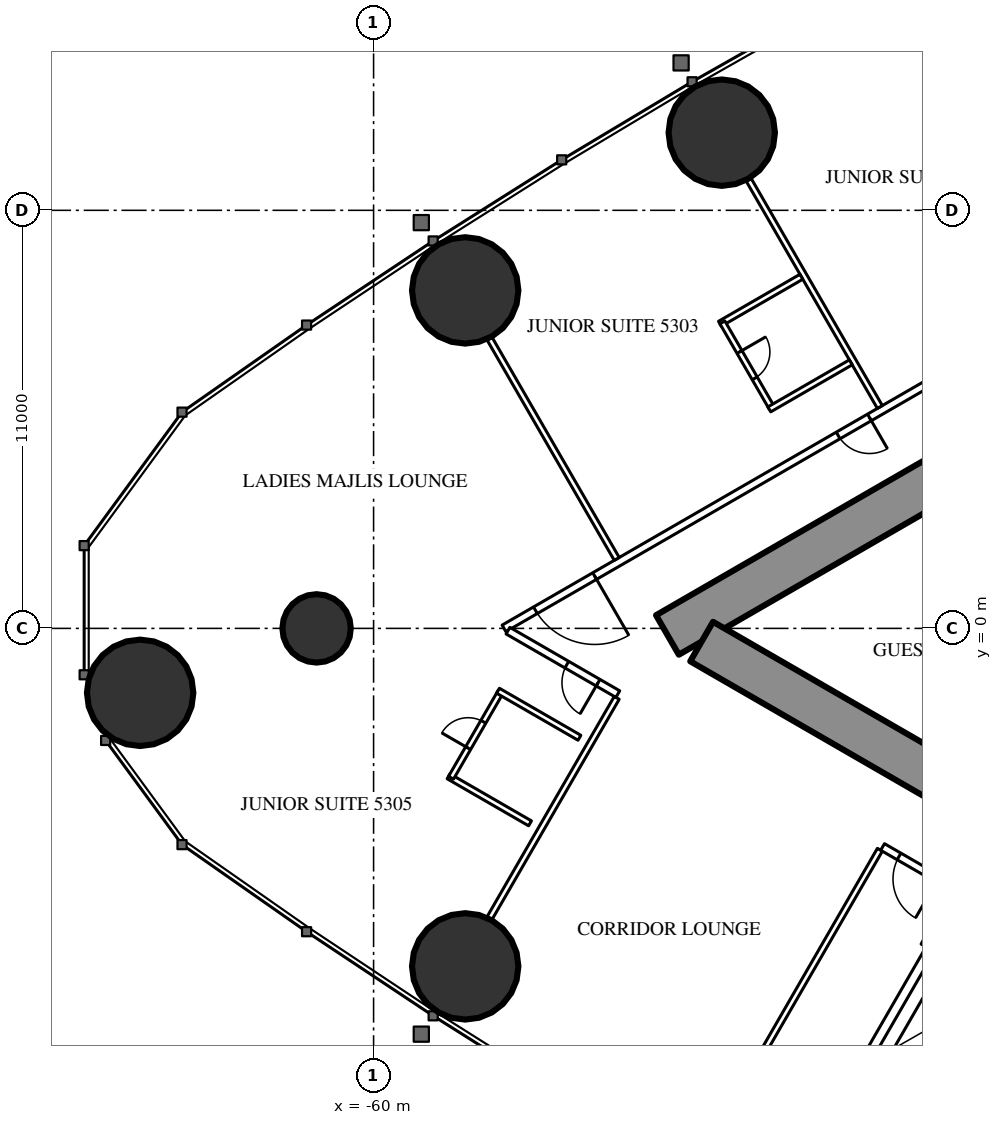
"""IFC4 building model, lengths in metres.
Left out: names, types, materials, properties, quantities, classifications, styles, units other than length and angle.
Written with IfcOpenShell. Run it as: python <this file> out.ifc"""

import sys

from ifc_helpers import new_model, si_unit, direction, frame, frame_2d, origin, origin_2d, place, context, subcontext, project, spatial, rectangle, circle, extrude, element, fill, save


model = new_model("IFC4")
c1 = context("Model", 3, precision=1e-05, world=origin(), true_north=direction((0.0, 1.0)))
c2 = subcontext(c1, "Body", "Model", "MODEL_VIEW")
j1 = project(units=[si_unit("LENGTHUNIT", "METRE"), si_unit("PLANEANGLEUNIT", "RADIAN")], contexts=[c1])
p1 = place(None, origin())
s1 = spatial("IfcSite", under=j1, at=p1, CompositionType="ELEMENT")
p2 = place(p1, origin())
s2 = spatial("IfcBuilding", under=s1, at=p2, CompositionType="ELEMENT")
p3 = place(p2, frame((0.0, 0.0, 198.3)))
s3 = spatial("IfcBuildingStorey", under=s2, at=p3, CompositionType="ELEMENT", Elevation=198.3)
for number, where, z_axis, x_axis in (
    (1, (-66.143, -1.695, 0.0), (0.0, 0.0, 1.0), (1.0, 0.0, 0.0)),
    (2, (-57.59, -8.893, 0.0), (0.0, 0.0, 1.0), (1.0, 0.0, 0.0)),
    (3, (-50.839, 13.043, 0.0), (0.0, 0.0, 1.0), (1.0, 0.0, 0.0)),
    (4, (-57.59, 8.893, 0.0), (0.0, 0.0, 1.0), (1.0, 0.0, 0.0)),
):
    element("IfcColumn", number, at=place(p3, frame(where, z_axis=z_axis, x_axis=x_axis)), inside=s3, PredefinedType="COLUMN", context=c2, shape_type="SweptSolid", body=[
        extrude(circle(Radius=1.4, at=origin_2d()), origin(), (0.0, 0.0, 1.0), 3.5),
    ])
p4 = place(p3, frame((-61.5, 0.0, 0.0), z_axis=(0.0, 0.0, 1.0), x_axis=(1.0, 0.0, 0.0)))
e5 = element("IfcColumn", 5, at=p4, inside=s3, PredefinedType="COLUMN", context=c2, shape_type="SweptSolid", body=[
    extrude(circle(Radius=0.9, at=origin_2d()), origin(), (0.0, 0.0, 1.0), 3.5),
])
p5 = place(p3, frame((-27.2, 14.3, 0.0), z_axis=(0.0, 0.0, 1.0), x_axis=(-0.866026593062, -0.499997940104, 0.0)))
e6 = element("IfcWall", 6, at=p5, inside=s3, PredefinedType="SHEAR", context=c2, shape_type="SweptSolid", body=[
    extrude(rectangle(XDim=28.946, YDim=1.2, at=frame_2d((14.473, 0.0))), origin(), (0.0, 0.0, 1.0), 3.5),
])
p6 = place(p5, frame((4.6, 0.0, 0.0)))
e7 = element("IfcOpeningElement", 7, at=p6, cuts=e6, PredefinedType="OPENING", context=c2, shape_type="SweptSolid", body=[
    extrude(rectangle(XDim=1.0, YDim=2.2, at=frame_2d((0.5, 1.1))), frame((0.0, 0.61, 0.0), z_axis=(0.0, -1.0, 0.0), x_axis=(1.0, 0.0, 0.0)), (0.0, 0.0, 1.0), 1.22),
])
p7 = place(p5, frame((13.395, 0.0, 0.0)))
e8 = element("IfcOpeningElement", 8, at=p7, cuts=e6, PredefinedType="OPENING", context=c2, shape_type="SweptSolid", body=[
    extrude(rectangle(XDim=1.8, YDim=2.2, at=frame_2d((0.9, 1.1))), frame((0.0, 0.61, 0.0), z_axis=(0.0, -1.0, 0.0), x_axis=(1.0, 0.0, 0.0)), (0.0, 0.0, 1.0), 1.22),
])
p8 = place(p3, frame((-27.2, -14.3, 0.0), z_axis=(0.0, 0.0, 1.0), x_axis=(-0.866024021859, 0.500002393557, 0.0)))
e9 = element("IfcWall", 9, at=p8, inside=s3, PredefinedType="SHEAR", context=c2, shape_type="SweptSolid", body=[
    extrude(rectangle(XDim=27.907, YDim=1.2, at=frame_2d((13.954, 0.0))), origin(), (0.0, 0.0, 1.0), 3.5),
])
p9 = place(p8, frame((4.6, 0.0, 0.0)))
e10 = element("IfcOpeningElement", 10, at=p9, cuts=e9, PredefinedType="OPENING", context=c2, shape_type="SweptSolid", body=[
    extrude(rectangle(XDim=1.0, YDim=2.2, at=frame_2d((0.5, 1.1))), frame((0.0, 0.61, 0.0), z_axis=(0.0, -1.0, 0.0), x_axis=(1.0, 0.0, 0.0)), (0.0, 0.0, 1.0), 1.22),
])
p10 = place(p8, frame((13.395, 0.0, 0.0)))
e11 = element("IfcOpeningElement", 11, at=p10, cuts=e9, PredefinedType="OPENING", context=c2, shape_type="SweptSolid", body=[
    extrude(rectangle(XDim=1.8, YDim=2.2, at=frame_2d((0.9, 1.1))), frame((0.0, 0.61, 0.0), z_axis=(0.0, -1.0, 0.0), x_axis=(1.0, 0.0, 0.0)), (0.0, 0.0, 1.0), 1.22),
])
p11 = place(p3, frame((-27.86, 16.575, 0.0), z_axis=(0.0, 0.0, 1.0), x_axis=(-0.866025533911, -0.499999774615, 0.0)))
e12 = element("IfcWall", 12, at=p11, inside=s3, PredefinedType="PARTITIONING", context=c2, shape_type="SweptSolid", body=[
    extrude(rectangle(XDim=33.149, YDim=0.2, at=frame_2d((16.575, 0.0))), origin(), (0.0, 0.0, 1.0), 3.25),
])
p12 = place(p11, frame((3.75, 0.0, 0.0)))
e13 = element("IfcOpeningElement", 13, at=p12, cuts=e12, PredefinedType="OPENING", context=c2, shape_type="SweptSolid", body=[
    extrude(rectangle(XDim=1.0, YDim=2.2, at=frame_2d((0.5, 1.1))), frame((0.0, 0.11, 0.0), z_axis=(0.0, -1.0, 0.0), x_axis=(1.0, 0.0, 0.0)), (0.0, 0.0, 1.0), 0.22),
])
p13 = place(p11, frame((16.402, 0.0, 0.0)))
e14 = element("IfcOpeningElement", 14, at=p13, cuts=e12, PredefinedType="OPENING", context=c2, shape_type="SweptSolid", body=[
    extrude(rectangle(XDim=0.95, YDim=2.2, at=frame_2d((0.475, 1.1))), frame((0.0, 0.11, 0.0), z_axis=(0.0, -1.0, 0.0), x_axis=(1.0, 0.0, 0.0)), (0.0, 0.0, 1.0), 0.22),
])
p14 = place(p11, frame((22.047, 0.0, 0.0)))
e15 = element("IfcOpeningElement", 15, at=p14, cuts=e12, PredefinedType="OPENING", context=c2, shape_type="SweptSolid", body=[
    extrude(rectangle(XDim=0.95, YDim=2.2, at=frame_2d((0.475, 1.1))), frame((0.0, 0.11, 0.0), z_axis=(0.0, -1.0, 0.0), x_axis=(1.0, 0.0, 0.0)), (0.0, 0.0, 1.0), 0.22),
])
p15 = place(p11, frame((30.396, 0.0, 0.0)))
e16 = element("IfcOpeningElement", 16, at=p15, cuts=e12, PredefinedType="OPENING", context=c2, shape_type="SweptSolid", body=[
    extrude(rectangle(XDim=1.8, YDim=2.2, at=frame_2d((0.9, 1.1))), frame((0.0, 0.11, 0.0), z_axis=(0.0, -1.0, 0.0), x_axis=(1.0, 0.0, 0.0)), (0.0, 0.0, 1.0), 0.22),
])
p16 = place(p3, frame((-46.679, 5.825, 0.0), z_axis=(0.0, 0.0, 1.0), x_axis=(-0.500006839597, 0.866021454905, 0.0)))
e17 = element("IfcWall", 17, at=p16, inside=s3, PredefinedType="PARTITIONING", context=c2, shape_type="SweptSolid", body=[
    extrude(rectangle(XDim=6.911, YDim=0.15, at=frame_2d((3.456, 0.0))), origin(), (0.0, 0.0, 1.0), 2.3),
])
p17 = place(p3, frame((-53.602, 1.828, 0.0), z_axis=(0.0, 0.0, 1.0), x_axis=(-0.49999191814, 0.866030069798, 0.0)))
e18 = element("IfcWall", 18, at=p17, inside=s3, PredefinedType="PARTITIONING", context=c2, shape_type="SweptSolid", body=[
    extrude(rectangle(XDim=6.692, YDim=0.15, at=frame_2d((3.346, 0.0))), origin(), (0.0, 0.0, 1.0), 2.3),
])
p18 = place(p3, frame((-46.679, -5.825, 0.0), z_axis=(0.0, 0.0, 1.0), x_axis=(-0.500006839597, -0.866021454905, 0.0)))
e19 = element("IfcWall", 19, at=p18, inside=s3, PredefinedType="PARTITIONING", context=c2, shape_type="SweptSolid", body=[
    extrude(rectangle(XDim=6.911, YDim=0.15, at=frame_2d((3.456, 0.0))), origin(), (0.0, 0.0, 1.0), 2.3),
])
p19 = place(p3, frame((-53.602, -1.828, 0.0), z_axis=(0.0, 0.0, 1.0), x_axis=(-0.49999191814, -0.866030069798, 0.0)))
e20 = element("IfcWall", 20, at=p19, inside=s3, PredefinedType="PARTITIONING", context=c2, shape_type="SweptSolid", body=[
    extrude(rectangle(XDim=6.692, YDim=0.15, at=frame_2d((3.346, 0.0))), origin(), (0.0, 0.0, 1.0), 2.3),
])
p20 = place(p3, frame((-44.652, -6.764, 0.0), z_axis=(0.0, 0.0, 1.0), x_axis=(-0.485424724123, -0.874278466629, 0.0)))
e21 = element("IfcWall", 21, at=p20, inside=s3, PredefinedType="PARTITIONING", context=c2, shape_type="SweptSolid", body=[
    extrude(rectangle(XDim=1.805, YDim=0.15, at=frame_2d((0.903, 0.0))), origin(), (0.0, 0.0, 1.0), 3.25),
])
p21 = place(p3, frame((-44.715, -6.844, 0.0), z_axis=(0.0, 0.0, 1.0), x_axis=(-0.865999496279, 0.500044870432, 0.0)))
e22 = element("IfcWall", 22, at=p21, inside=s3, PredefinedType="PARTITIONING", context=c2, shape_type="SweptSolid", body=[
    extrude(rectangle(XDim=2.185, YDim=0.2, at=frame_2d((1.092, 0.0))), origin(), (0.0, 0.0, 1.0), 3.25),
])
p22 = place(p21, frame((0.5, 0.0, 0.0)))
e23 = element("IfcOpeningElement", 23, at=p22, cuts=e22, PredefinedType="OPENING", context=c2, shape_type="SweptSolid", body=[
    extrude(rectangle(XDim=1.185, YDim=2.2, at=frame_2d((0.593, 1.1))), frame((0.0, 0.11, 0.0), z_axis=(0.0, -1.0, 0.0), x_axis=(1.0, 0.0, 0.0)), (0.0, 0.0, 1.0), 0.22),
])
p23 = place(p3, frame((-53.574, -1.729, 0.0), z_axis=(0.0, 0.0, 1.0), x_axis=(-0.866019930389, 0.500009480079, 0.0)))
e24 = element("IfcWall", 24, at=p23, inside=s3, PredefinedType="PARTITIONING", context=c2, shape_type="SweptSolid", body=[
    extrude(rectangle(XDim=3.338, YDim=0.2, at=frame_2d((1.669, 0.0))), origin(), (0.0, 0.0, 1.0), 3.25),
])
p24 = place(p23, frame((0.6, 0.0, 0.0)))
e25 = element("IfcOpeningElement", 25, at=p24, cuts=e24, PredefinedType="OPENING", context=c2, shape_type="SweptSolid", body=[
    extrude(rectangle(XDim=0.95, YDim=2.2, at=frame_2d((0.475, 1.1))), frame((0.0, 0.11, 0.0), z_axis=(0.0, -1.0, 0.0), x_axis=(1.0, 0.0, 0.0)), (0.0, 0.0, 1.0), 0.22),
])
p25 = place(p3, frame((-48.744, 9.252, 0.0), z_axis=(0.0, 0.0, 1.0), x_axis=(-0.866006523861, -0.500032699561, 0.0)))
e26 = element("IfcWall", 26, at=p25, inside=s3, PredefinedType="PARTITIONING", context=c2, shape_type="SweptSolid", body=[
    extrude(rectangle(XDim=2.475, YDim=0.15, at=frame_2d((1.237, 0.0))), origin(), (0.0, 0.0, 1.0), 3.25),
])
p26 = place(p3, frame((-49.522, 5.8, 0.0), z_axis=(0.0, 0.0, 1.0), x_axis=(-0.500006934395, 0.866021400173, 0.0)))
e27 = element("IfcWall", 27, at=p26, inside=s3, PredefinedType="PARTITIONING", context=c2, shape_type="SweptSolid", body=[
    extrude(rectangle(XDim=2.6, YDim=0.15, at=frame_2d((1.3, 0.0))), origin(), (0.0, 0.0, 1.0), 3.25),
])
p27 = place(p26, frame((0.9, 0.0, 0.0)))
e28 = element("IfcOpeningElement", 28, at=p27, cuts=e27, PredefinedType="OPENING", context=c2, shape_type="SweptSolid", body=[
    extrude(rectangle(XDim=0.8, YDim=2.2, at=frame_2d((0.4, 1.1))), frame((0.0, 0.085, 0.0), z_axis=(0.0, -1.0, 0.0), x_axis=(1.0, 0.0, 0.0)), (0.0, 0.0, 1.0), 0.17),
])
for number, where, z_axis, x_axis in (
    (29, (-47.444, 7.0, 0.0), (0.0, 0.0, 1.0), (-0.866, -0.5, 0.0)),
    (30, (-55.884, -5.13, 0.0), (0.0, 0.0, 1.0), (-0.866, 0.5, 0.0)),
):
    element("IfcWall", number, at=place(p3, frame(where, z_axis=z_axis, x_axis=x_axis)), inside=s3, PredefinedType="PARTITIONING", context=c2, shape_type="SweptSolid", body=[
        extrude(rectangle(XDim=2.475, YDim=0.15, at=frame_2d((1.237, 0.0))), origin(), (0.0, 0.0, 1.0), 3.25),
    ])
p28 = place(p3, frame((-56.662, -1.678, 0.0), z_axis=(0.0, 0.0, 1.0), x_axis=(-0.500006934395, -0.866021400173, 0.0)))
e31 = element("IfcWall", 31, at=p28, inside=s3, PredefinedType="PARTITIONING", context=c2, shape_type="SweptSolid", body=[
    extrude(rectangle(XDim=2.6, YDim=0.15, at=frame_2d((1.3, 0.0))), origin(), (0.0, 0.0, 1.0), 3.25),
])
p29 = place(p28, frame((0.9, 0.0, 0.0)))
e32 = element("IfcOpeningElement", 32, at=p29, cuts=e31, PredefinedType="OPENING", context=c2, shape_type="SweptSolid", body=[
    extrude(rectangle(XDim=0.8, YDim=2.2, at=frame_2d((0.4, 1.1))), frame((0.0, 0.085, 0.0), z_axis=(0.0, -1.0, 0.0), x_axis=(1.0, 0.0, 0.0)), (0.0, 0.0, 1.0), 0.17),
])
p30 = place(p3, frame((-54.583, -2.878, 0.0), z_axis=(0.0, 0.0, 1.0), x_axis=(-0.866006523861, 0.500032699561, 0.0)))
e33 = element("IfcWall", 33, at=p30, inside=s3, PredefinedType="PARTITIONING", context=c2, shape_type="SweptSolid", body=[
    extrude(rectangle(XDim=2.475, YDim=0.15, at=frame_2d((1.237, 0.0))), origin(), (0.0, 0.0, 1.0), 3.25),
])
p31 = place(p3, frame((-45.428, -8.568, 0.0), z_axis=(0.0, 0.0, 1.0), x_axis=(-0.499929347863, -0.866066190972, 0.0)))
e34 = element("IfcWall", 34, at=p31, inside=s3, PredefinedType="PARTITIONING", context=c2, shape_type="SweptSolid", body=[
    extrude(rectangle(XDim=3.201, YDim=0.25, at=frame_2d((1.6, 0.0))), origin(), (0.0, 0.0, 1.0), 3.25),
])
p32 = place(p27, origin())
e35 = element("IfcDoor", 35, at=p32, inside=s3, OperationType="SINGLE_SWING_RIGHT", PredefinedType="DOOR", context=c2, shape_type="SweptSolid", body=[
    extrude(rectangle(XDim=0.8, YDim=2.2, at=frame_2d((0.4, 1.1))), frame((0.0, 0.025, 0.0), z_axis=(0.0, -1.0, 0.0), x_axis=(1.0, 0.0, 0.0)), (0.0, 0.0, 1.0), 0.05),
])
fill(e28, e35)
p33 = place(p14, origin())
e36 = element("IfcDoor", 36, at=p33, inside=s3, OperationType="SINGLE_SWING_LEFT", PredefinedType="DOOR", context=c2, shape_type="SweptSolid", body=[
    extrude(rectangle(XDim=0.95, YDim=2.2, at=frame_2d((0.475, 1.1))), frame((0.0, 0.025, 0.0), z_axis=(0.0, -1.0, 0.0), x_axis=(1.0, 0.0, 0.0)), (0.0, 0.0, 1.0), 0.05),
])
fill(e15, e36)
p34 = place(p15, origin())
e37 = element("IfcDoor", 37, at=p34, inside=s3, OperationType="DOUBLE_DOOR_SINGLE_SWING", PredefinedType="DOOR", context=c2, shape_type="SweptSolid", body=[
    extrude(rectangle(XDim=1.8, YDim=2.2, at=frame_2d((0.9, 1.1))), frame((0.0, 0.025, 0.0), z_axis=(0.0, -1.0, 0.0), x_axis=(1.0, 0.0, 0.0)), (0.0, 0.0, 1.0), 0.05),
])
fill(e16, e37)
p35 = place(p29, origin())
e38 = element("IfcDoor", 38, at=p35, inside=s3, OperationType="SINGLE_SWING_RIGHT", PredefinedType="DOOR", context=c2, shape_type="SweptSolid", body=[
    extrude(rectangle(XDim=0.8, YDim=2.2, at=frame_2d((0.4, 1.1))), frame((0.0, 0.025, 0.0), z_axis=(0.0, -1.0, 0.0), x_axis=(1.0, 0.0, 0.0)), (0.0, 0.0, 1.0), 0.05),
])
fill(e32, e38)
p36 = place(p24, origin())
e39 = element("IfcDoor", 39, at=p36, inside=s3, OperationType="SINGLE_SWING_LEFT", PredefinedType="DOOR", context=c2, shape_type="SweptSolid", body=[
    extrude(rectangle(XDim=0.95, YDim=2.2, at=frame_2d((0.475, 1.1))), frame((0.0, 0.025, 0.0), z_axis=(0.0, -1.0, 0.0), x_axis=(1.0, 0.0, 0.0)), (0.0, 0.0, 1.0), 0.05),
])
fill(e25, e39)
p37 = place(p22, origin())
e40 = element("IfcDoor", 40, at=p37, inside=s3, OperationType="SINGLE_SWING_LEFT", PredefinedType="DOOR", context=c2, shape_type="SweptSolid", body=[
    extrude(rectangle(XDim=1.185, YDim=2.2, at=frame_2d((0.593, 1.1))), frame((0.0, 0.025, 0.0), z_axis=(0.0, -1.0, 0.0), x_axis=(1.0, 0.0, 0.0)), (0.0, 0.0, 1.0), 0.05),
])
fill(e23, e40)
save(model, sys.argv[1])
